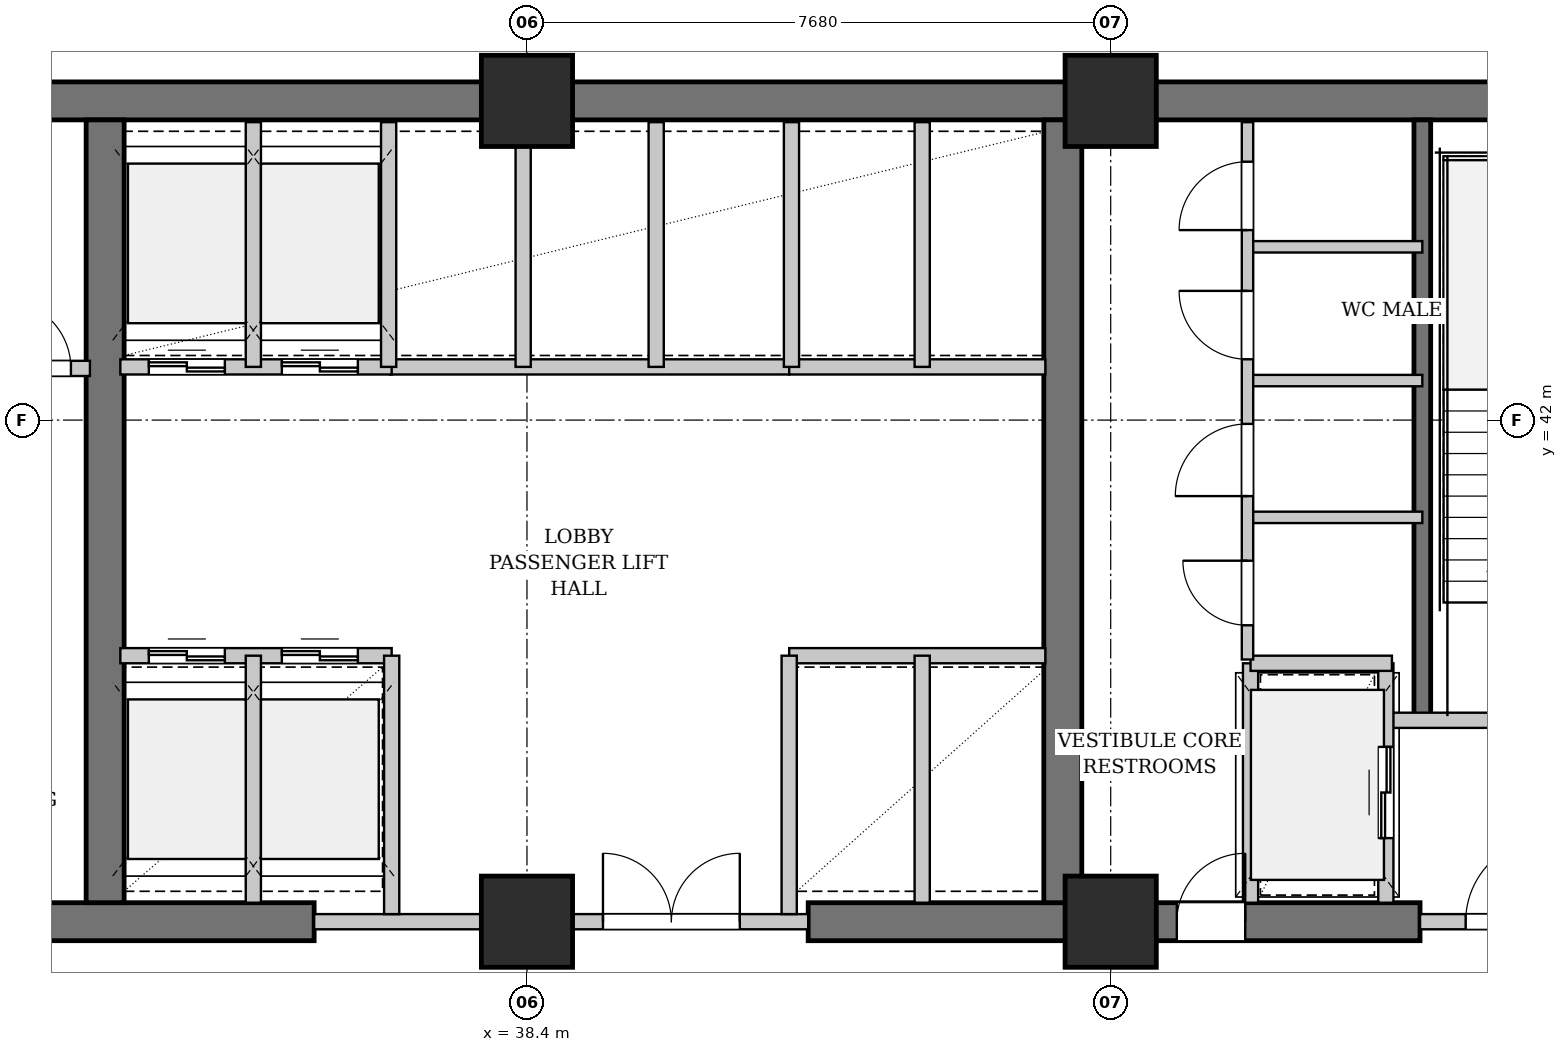
"""IFC4 building model, lengths in metres.
Left out: names, types, materials, properties, quantities, classifications, styles, units other than length and angle.
Written with IfcOpenShell. Run it as: python <this file> out.ifc"""

import sys

from ifc_helpers import new_model, si_unit, direction, frame, frame_2d, origin, origin_2d, place, context, subcontext, project, spatial, rectangle, extrude, element, fill, save


model = new_model("IFC4")
c1 = context("Model", 3, precision=1e-05, world=origin(), true_north=direction((0.0, 1.0)))
c2 = subcontext(c1, "Body", "Model", "MODEL_VIEW")
j1 = project(units=[si_unit("LENGTHUNIT", "METRE"), si_unit("PLANEANGLEUNIT", "RADIAN")], contexts=[c1])
p1 = place(None, origin())
s1 = spatial("IfcSite", under=j1, at=p1, CompositionType="ELEMENT")
p2 = place(p1, origin())
s2 = spatial("IfcBuilding", under=s1, at=p2, CompositionType="ELEMENT")
p3 = place(p2, frame((0.0, 0.0, 85.8)))
s3 = spatial("IfcBuildingStorey", under=s2, at=p3, CompositionType="ELEMENT", Elevation=85.8)
p4 = place(p3, frame((22.79, 46.2, 0.0), z_axis=(0.0, 0.0, 1.0), x_axis=(1.0, 0.0, 0.0)))
e1 = element("IfcWall", 1, at=p4, inside=s3, PredefinedType="SHEAR", context=c2, shape_type="SweptSolid", body=[
    extrude(rectangle(XDim=31.22, YDim=0.5, at=frame_2d((15.61, 0.0))), origin(), (0.0, 0.0, 1.0), 3.48),
])
p5 = place(p3, frame((30.72, 35.4, 0.0), z_axis=(0.0, 0.0, 1.0), x_axis=(1.0, 0.0, 0.0)))
e2 = element("IfcWall", 2, at=p5, inside=s3, PredefinedType="SHEAR", context=c2, shape_type="SweptSolid", body=[
    extrude(rectangle(XDim=4.88, YDim=0.5, at=frame_2d((2.44, 0.0))), origin(), (0.0, 0.0, 1.0), 3.48),
])
p6 = place(p3, frame((42.1, 35.4, 0.0), z_axis=(0.0, 0.0, 1.0), x_axis=(1.0, 0.0, 0.0)))
e3 = element("IfcWall", 3, at=p6, inside=s3, PredefinedType="SHEAR", context=c2, shape_type="SweptSolid", body=[
    extrude(rectangle(XDim=8.05, YDim=0.5, at=frame_2d((4.025, 0.0))), origin(), (0.0, 0.0, 1.0), 3.48),
])
p7 = place(p6, frame((4.85, 0.0, 0.0)))
e4 = element("IfcOpeningElement", 4, at=p7, cuts=e3, PredefinedType="OPENING", context=c2, shape_type="SweptSolid", body=[
    extrude(rectangle(XDim=0.9, YDim=2.15, at=frame_2d((0.45, 1.075))), frame((0.0, 0.26, 0.0), z_axis=(0.0, -1.0, 0.0), x_axis=(1.0, 0.0, 0.0)), (0.0, 0.0, 1.0), 0.52),
])
for number, where, z_axis, x_axis in (
    (5, (32.85, 35.65, 0.0), (0.0, 0.0, 1.0), (0.0, 1.0, 0.0)),
    (6, (45.45, 35.65, 0.0), (0.0, 0.0, 1.0), (0.0, 1.0, 0.0)),
):
    element("IfcWall", number, at=place(p3, frame(where, z_axis=z_axis, x_axis=x_axis)), inside=s3, PredefinedType="SHEAR", context=c2, shape_type="SweptSolid", body=[
        extrude(rectangle(XDim=10.3, YDim=0.5, at=frame_2d((5.15, 0.0))), origin(), (0.0, 0.0, 1.0), 3.48),
    ])
p8 = place(p3, frame((50.18, 38.05, 0.0), z_axis=(0.0, 0.0, 1.0), x_axis=(0.0, 1.0, 0.0)))
e7 = element("IfcWall", 7, at=p8, inside=s3, PredefinedType="SHEAR", context=c2, shape_type="SweptSolid", body=[
    extrude(rectangle(XDim=7.9, YDim=0.22, at=frame_2d((3.95, 0.0))), origin(), (0.0, 0.0, 1.0), 3.48),
])
for number, where, z_axis, x_axis in (
    (8, (38.4, 35.4, 0.0), (0.0, 0.0, 1.0), (1.0, 0.0, 0.0)),
    (9, (38.4, 46.2, 0.0), (0.0, 0.0, 1.0), (1.0, 0.0, 0.0)),
    (10, (46.08, 35.4, 0.0), (0.0, 0.0, 1.0), (1.0, 0.0, 0.0)),
    (11, (46.08, 46.2, 0.0), (0.0, 0.0, 1.0), (1.0, 0.0, 0.0)),
):
    element("IfcColumn", number, at=place(p3, frame(where, z_axis=z_axis, x_axis=x_axis)), inside=s3, PredefinedType="COLUMN", context=c2, shape_type="SweptSolid", body=[
        extrude(rectangle(XDim=1.2, YDim=1.2, at=origin_2d()), origin(), (0.0, 0.0, 1.0), 3.9),
    ])
p9 = place(p3, frame((27.32, 42.68, 0.0), z_axis=(0.0, 0.0, 1.0), x_axis=(1.0, 0.0, 0.0)))
e12 = element("IfcWall", 12, at=p9, inside=s3, PredefinedType="PARTITIONING", context=c2, shape_type="SweptSolid", body=[
    extrude(rectangle(XDim=5.33, YDim=0.2, at=frame_2d((2.665, 0.0))), origin(), (0.0, 0.0, 1.0), 3.48),
])
p10 = place(p9, frame((4.18, 0.0, 0.0)))
e13 = element("IfcOpeningElement", 13, at=p10, cuts=e12, PredefinedType="OPENING", context=c2, shape_type="SweptSolid", body=[
    extrude(rectangle(XDim=0.9, YDim=2.15, at=frame_2d((0.45, 1.075))), frame((0.0, 0.11, 0.0), z_axis=(0.0, -1.0, 0.0), x_axis=(1.0, 0.0, 0.0)), (0.0, 0.0, 1.0), 0.22),
])
p11 = place(p3, frame((35.6, 35.4, 0.0), z_axis=(0.0, 0.0, 1.0), x_axis=(1.0, 0.0, 0.0)))
e14 = element("IfcWall", 14, at=p11, inside=s3, PredefinedType="PARTITIONING", context=c2, shape_type="SweptSolid", body=[
    extrude(rectangle(XDim=6.5, YDim=0.2, at=frame_2d((3.25, 0.0))), origin(), (0.0, 0.0, 1.0), 2.275),
])
p12 = place(p11, frame((3.8, 0.0, 0.0)))
e15 = element("IfcOpeningElement", 15, at=p12, cuts=e14, PredefinedType="OPENING", context=c2, shape_type="SweptSolid", body=[
    extrude(rectangle(XDim=1.8, YDim=2.3, at=frame_2d((0.9, 1.15))), frame((0.0, 0.11, 0.0), z_axis=(0.0, -1.0, 0.0), x_axis=(1.0, 0.0, 0.0)), (0.0, 0.0, 1.0), 0.22),
])
p13 = place(p3, frame((36.6, 42.7, 0.0), z_axis=(0.0, 0.0, 1.0), x_axis=(1.0, 0.0, 0.0)))
e16 = element("IfcWall", 16, at=p13, inside=s3, PredefinedType="PARTITIONING", context=c2, shape_type="SweptSolid", body=[
    extrude(rectangle(XDim=5.25, YDim=0.2, at=frame_2d((2.625, 0.0))), origin(), (0.0, 0.0, 1.0), 3.48),
])
p14 = place(p3, frame((38.35, 42.7, 0.0), z_axis=(0.0, 0.0, 1.0), x_axis=(0.0, 1.0, 0.0)))
e17 = element("IfcWall", 17, at=p14, inside=s3, PredefinedType="PARTITIONING", context=c2, shape_type="SweptSolid", body=[
    extrude(rectangle(XDim=3.22, YDim=0.2, at=frame_2d((1.61, 0.0))), origin(), (0.0, 0.0, 1.0), 2.565),
])
p15 = place(p3, frame((40.1, 42.7, 0.0), z_axis=(0.0, 0.0, 1.0), x_axis=(0.0, 1.0, 0.0)))
e18 = element("IfcWall", 18, at=p15, inside=s3, PredefinedType="PARTITIONING", context=c2, shape_type="SweptSolid", body=[
    extrude(rectangle(XDim=3.22, YDim=0.2, at=frame_2d((1.61, 0.0))), origin(), (0.0, 0.0, 1.0), 3.48),
])
p16 = place(p3, frame((33.05, 38.9, 0.0), z_axis=(0.0, 0.0, 1.0), x_axis=(1.0, 0.0, 0.0)))
e19 = element("IfcWall", 19, at=p16, inside=s3, PredefinedType="PARTITIONING", context=c2, shape_type="SweptSolid", body=[
    extrude(rectangle(XDim=3.57, YDim=0.2, at=frame_2d((1.785, 0.0))), origin(), (0.0, 0.0, 1.0), 3.48),
])
p17 = place(p16, frame((0.375, 0.0, 0.0)))
e20 = element("IfcOpeningElement", 20, at=p17, cuts=e19, PredefinedType="OPENING", context=c2, shape_type="SweptSolid", body=[
    extrude(rectangle(XDim=1.0, YDim=2.2, at=frame_2d((0.5, 1.1))), frame((0.0, 0.11, 0.0), z_axis=(0.0, -1.0, 0.0), x_axis=(1.0, 0.0, 0.0)), (0.0, 0.0, 1.0), 0.22),
])
p18 = place(p16, frame((2.125, 0.0, 0.0)))
e21 = element("IfcOpeningElement", 21, at=p18, cuts=e19, PredefinedType="OPENING", context=c2, shape_type="SweptSolid", body=[
    extrude(rectangle(XDim=1.0, YDim=2.2, at=frame_2d((0.5, 1.1))), frame((0.0, 0.11, 0.0), z_axis=(0.0, -1.0, 0.0), x_axis=(1.0, 0.0, 0.0)), (0.0, 0.0, 1.0), 0.22),
])
p19 = place(p3, frame((33.05, 42.7, 0.0), z_axis=(0.0, 0.0, 1.0), x_axis=(1.0, 0.0, 0.0)))
e22 = element("IfcWall", 22, at=p19, inside=s3, PredefinedType="PARTITIONING", context=c2, shape_type="SweptSolid", body=[
    extrude(rectangle(XDim=3.57, YDim=0.2, at=frame_2d((1.785, 0.0))), origin(), (0.0, 0.0, 1.0), 3.48),
])
p20 = place(p19, frame((0.375, 0.0, 0.0)))
e23 = element("IfcOpeningElement", 23, at=p20, cuts=e22, PredefinedType="OPENING", context=c2, shape_type="SweptSolid", body=[
    extrude(rectangle(XDim=1.0, YDim=2.2, at=frame_2d((0.5, 1.1))), frame((0.0, 0.11, 0.0), z_axis=(0.0, -1.0, 0.0), x_axis=(1.0, 0.0, 0.0)), (0.0, 0.0, 1.0), 0.22),
])
p21 = place(p19, frame((2.125, 0.0, 0.0)))
e24 = element("IfcOpeningElement", 24, at=p21, cuts=e22, PredefinedType="OPENING", context=c2, shape_type="SweptSolid", body=[
    extrude(rectangle(XDim=1.0, YDim=2.2, at=frame_2d((0.5, 1.1))), frame((0.0, 0.11, 0.0), z_axis=(0.0, -1.0, 0.0), x_axis=(1.0, 0.0, 0.0)), (0.0, 0.0, 1.0), 0.22),
])
p22 = place(p3, frame((34.8, 35.65, 0.0), z_axis=(0.0, 0.0, 1.0), x_axis=(0.0, 1.0, 0.0)))
e25 = element("IfcWall", 25, at=p22, inside=s3, PredefinedType="PARTITIONING", context=c2, shape_type="SweptSolid", body=[
    extrude(rectangle(XDim=3.25, YDim=0.2, at=frame_2d((1.625, 0.0))), origin(), (0.0, 0.0, 1.0), 3.48),
])
p23 = place(p3, frame((34.8, 42.7, 0.0), z_axis=(0.0, 0.0, 1.0), x_axis=(0.0, 1.0, 0.0)))
e26 = element("IfcWall", 26, at=p23, inside=s3, PredefinedType="PARTITIONING", context=c2, shape_type="SweptSolid", body=[
    extrude(rectangle(XDim=3.22, YDim=0.2, at=frame_2d((1.61, 0.0))), origin(), (0.0, 0.0, 1.0), 3.48),
])
p24 = place(p3, frame((36.62, 35.5, 0.0), z_axis=(0.0, 0.0, 1.0), x_axis=(0.0, 1.0, 0.0)))
e27 = element("IfcWall", 27, at=p24, inside=s3, PredefinedType="PARTITIONING", context=c2, shape_type="SweptSolid", body=[
    extrude(rectangle(XDim=3.4, YDim=0.2, at=frame_2d((1.7, 0.0))), origin(), (0.0, 0.0, 1.0), 3.48),
])
p25 = place(p3, frame((36.58, 42.7, 0.0), z_axis=(0.0, 0.0, 1.0), x_axis=(0.0, 1.0, 0.0)))
e28 = element("IfcWall", 28, at=p25, inside=s3, PredefinedType="PARTITIONING", context=c2, shape_type="SweptSolid", body=[
    extrude(rectangle(XDim=3.22, YDim=0.2, at=frame_2d((1.61, 0.0))), origin(), (0.0, 0.0, 1.0), 3.48),
])
for number, where, z_axis, x_axis in (
    (29, (41.85, 38.9, 0.0), (0.0, 0.0, 1.0), (1.0, 0.0, 0.0)),
    (30, (41.85, 42.7, 0.0), (0.0, 0.0, 1.0), (1.0, 0.0, 0.0)),
):
    element("IfcWall", number, at=place(p3, frame(where, z_axis=z_axis, x_axis=x_axis)), inside=s3, PredefinedType="PARTITIONING", context=c2, shape_type="SweptSolid", body=[
        extrude(rectangle(XDim=3.37, YDim=0.2, at=frame_2d((1.685, 0.0))), origin(), (0.0, 0.0, 1.0), 3.48),
    ])
p26 = place(p3, frame((43.6, 35.65, 0.0), z_axis=(0.0, 0.0, 1.0), x_axis=(0.0, 1.0, 0.0)))
e31 = element("IfcWall", 31, at=p26, inside=s3, PredefinedType="PARTITIONING", context=c2, shape_type="SweptSolid", body=[
    extrude(rectangle(XDim=3.25, YDim=0.2, at=frame_2d((1.625, 0.0))), origin(), (0.0, 0.0, 1.0), 3.48),
])
p27 = place(p3, frame((43.6, 42.7, 0.0), z_axis=(0.0, 0.0, 1.0), x_axis=(0.0, 1.0, 0.0)))
e32 = element("IfcWall", 32, at=p27, inside=s3, PredefinedType="PARTITIONING", context=c2, shape_type="SweptSolid", body=[
    extrude(rectangle(XDim=3.22, YDim=0.2, at=frame_2d((1.61, 0.0))), origin(), (0.0, 0.0, 1.0), 3.48),
])
p28 = place(p3, frame((41.85, 35.5, 0.0), z_axis=(0.0, 0.0, 1.0), x_axis=(0.0, 1.0, 0.0)))
e33 = element("IfcWall", 33, at=p28, inside=s3, PredefinedType="PARTITIONING", context=c2, shape_type="SweptSolid", body=[
    extrude(rectangle(XDim=3.4, YDim=0.2, at=frame_2d((1.7, 0.0))), origin(), (0.0, 0.0, 1.0), 3.48),
])
p29 = place(p3, frame((41.88, 42.7, 0.0), z_axis=(0.0, 0.0, 1.0), x_axis=(0.0, 1.0, 0.0)))
e34 = element("IfcWall", 34, at=p29, inside=s3, PredefinedType="PARTITIONING", context=c2, shape_type="SweptSolid", body=[
    extrude(rectangle(XDim=3.22, YDim=0.2, at=frame_2d((1.61, 0.0))), origin(), (0.0, 0.0, 1.0), 3.48),
])
p30 = place(p3, frame((49.78, 38.05, 0.0), z_axis=(0.0, 0.0, 1.0), x_axis=(1.0, 0.0, 0.0)))
e35 = element("IfcWall", 35, at=p30, inside=s3, PredefinedType="PARTITIONING", context=c2, shape_type="SweptSolid", body=[
    extrude(rectangle(XDim=3.72, YDim=0.2, at=frame_2d((1.86, 0.0))), origin(), (0.0, 0.0, 1.0), 3.48),
])
p31 = place(p30, frame((1.436, 0.0, 0.0)))
e36 = element("IfcOpeningElement", 36, at=p31, cuts=e35, PredefinedType="OPENING", context=c2, shape_type="SweptSolid", body=[
    extrude(rectangle(XDim=1.1, YDim=2.15, at=frame_2d((0.55, 1.075))), frame((0.0, 0.11, 0.0), z_axis=(0.0, -1.0, 0.0), x_axis=(1.0, 0.0, 0.0)), (0.0, 0.0, 1.0), 0.22),
])
p32 = place(p3, frame((50.15, 35.4, 0.0), z_axis=(0.0, 0.0, 1.0), x_axis=(1.0, 0.0, 0.0)))
e37 = element("IfcWall", 37, at=p32, inside=s3, PredefinedType="PARTITIONING", context=c2, shape_type="SweptSolid", body=[
    extrude(rectangle(XDim=2.3, YDim=0.2, at=frame_2d((1.15, 0.0))), origin(), (0.0, 0.0, 1.0), 2.565),
])
p33 = place(p32, frame((0.6, 0.0, 0.0)))
e38 = element("IfcOpeningElement", 38, at=p33, cuts=e37, PredefinedType="OPENING", context=c2, shape_type="SweptSolid", body=[
    extrude(rectangle(XDim=1.1, YDim=2.15, at=frame_2d((0.55, 1.075))), frame((0.0, 0.11, 0.0), z_axis=(0.0, -1.0, 0.0), x_axis=(1.0, 0.0, 0.0)), (0.0, 0.0, 1.0), 0.22),
])
p34 = place(p3, frame((49.7, 35.65, 0.0), z_axis=(0.0, 0.0, 1.0), x_axis=(0.0, 1.0, 0.0)))
e39 = element("IfcWall", 39, at=p34, inside=s3, PredefinedType="PARTITIONING", context=c2, shape_type="SweptSolid", body=[
    extrude(rectangle(XDim=3.15, YDim=0.2, at=frame_2d((1.575, 0.0))), origin(), (0.0, 0.0, 1.0), 3.48),
])
p35 = place(p34, frame((0.85, 0.0, 0.0)))
e40 = element("IfcOpeningElement", 40, at=p35, cuts=e39, PredefinedType="OPENING", context=c2, shape_type="SweptSolid", body=[
    extrude(rectangle(XDim=1.2, YDim=2.2, at=frame_2d((0.6, 1.1))), frame((0.0, 0.11, 0.0), z_axis=(0.0, -1.0, 0.0), x_axis=(1.0, 0.0, 0.0)), (0.0, 0.0, 1.0), 0.22),
])
p36 = place(p3, frame((47.92, 35.65, 0.0), z_axis=(0.0, 0.0, 1.0), x_axis=(0.0, 1.0, 0.0)))
e41 = element("IfcWall", 41, at=p36, inside=s3, PredefinedType="PARTITIONING", context=c2, shape_type="SweptSolid", body=[
    extrude(rectangle(XDim=3.15, YDim=0.2, at=frame_2d((1.575, 0.0))), origin(), (0.0, 0.0, 1.0), 3.48),
])
p37 = place(p3, frame((47.92, 38.8, 0.0), z_axis=(0.0, 0.0, 1.0), x_axis=(1.0, 0.0, 0.0)))
e42 = element("IfcWall", 42, at=p37, inside=s3, PredefinedType="PARTITIONING", context=c2, shape_type="SweptSolid", body=[
    extrude(rectangle(XDim=1.86, YDim=0.2, at=frame_2d((0.93, 0.0))), origin(), (0.0, 0.0, 1.0), 3.48),
])
for number, where, z_axis, x_axis in (
    (43, (47.88, 40.72, 0.0), (0.0, 0.0, 1.0), (1.0, 0.0, 0.0)),
    (44, (47.88, 42.52, 0.0), (0.0, 0.0, 1.0), (1.0, 0.0, 0.0)),
    (45, (47.88, 44.28, 0.0), (0.0, 0.0, 1.0), (1.0, 0.0, 0.0)),
):
    element("IfcWall", number, at=place(p3, frame(where, z_axis=z_axis, x_axis=x_axis)), inside=s3, PredefinedType="PARTITIONING", context=c2, shape_type="SweptSolid", body=[
        extrude(rectangle(XDim=2.3, YDim=0.15, at=frame_2d((1.15, 0.0))), origin(), (0.0, 0.0, 1.0), 3.48),
    ])
p38 = place(p3, frame((47.88, 38.85, 0.0), z_axis=(0.0, 0.0, 1.0), x_axis=(0.0, 1.0, 0.0)))
e46 = element("IfcWall", 46, at=p38, inside=s3, PredefinedType="PARTITIONING", context=c2, shape_type="SweptSolid", body=[
    extrude(rectangle(XDim=7.07, YDim=0.15, at=frame_2d((3.535, 0.0))), origin(), (0.0, 0.0, 1.0), 3.48),
])
p39 = place(p38, frame((0.45, 0.0, 0.0)))
e47 = element("IfcOpeningElement", 47, at=p39, cuts=e46, PredefinedType="OPENING", context=c2, shape_type="SweptSolid", body=[
    extrude(rectangle(XDim=0.85, YDim=2.15, at=frame_2d((0.425, 1.075))), frame((0.0, 0.085, 0.0), z_axis=(0.0, -1.0, 0.0), x_axis=(1.0, 0.0, 0.0)), (0.0, 0.0, 1.0), 0.17),
])
p40 = place(p38, frame((2.15, 0.0, 0.0)))
e48 = element("IfcOpeningElement", 48, at=p40, cuts=e46, PredefinedType="OPENING", context=c2, shape_type="SweptSolid", body=[
    extrude(rectangle(XDim=0.95, YDim=2.15, at=frame_2d((0.475, 1.075))), frame((0.0, 0.085, 0.0), z_axis=(0.0, -1.0, 0.0), x_axis=(1.0, 0.0, 0.0)), (0.0, 0.0, 1.0), 0.17),
])
p41 = place(p38, frame((3.95, 0.0, 0.0)))
e49 = element("IfcOpeningElement", 49, at=p41, cuts=e46, PredefinedType="OPENING", context=c2, shape_type="SweptSolid", body=[
    extrude(rectangle(XDim=0.9, YDim=2.15, at=frame_2d((0.45, 1.075))), frame((0.0, 0.085, 0.0), z_axis=(0.0, -1.0, 0.0), x_axis=(1.0, 0.0, 0.0)), (0.0, 0.0, 1.0), 0.17),
])
p42 = place(p38, frame((5.65, 0.0, 0.0)))
e50 = element("IfcOpeningElement", 50, at=p42, cuts=e46, PredefinedType="OPENING", context=c2, shape_type="SweptSolid", body=[
    extrude(rectangle(XDim=0.9, YDim=2.15, at=frame_2d((0.45, 1.075))), frame((0.0, 0.085, 0.0), z_axis=(0.0, -1.0, 0.0), x_axis=(1.0, 0.0, 0.0)), (0.0, 0.0, 1.0), 0.17),
])
p43 = place(p10, origin())
e51 = element("IfcDoor", 51, at=p43, inside=s3, OperationType="SINGLE_SWING_LEFT", PredefinedType="DOOR", context=c2, shape_type="SweptSolid", body=[
    extrude(rectangle(XDim=0.9, YDim=2.15, at=frame_2d((0.45, 1.075))), frame((0.0, 0.025, 0.0), z_axis=(0.0, -1.0, 0.0), x_axis=(1.0, 0.0, 0.0)), (0.0, 0.0, 1.0), 0.05),
])
fill(e13, e51)
p44 = place(p12, origin())
e52 = element("IfcDoor", 52, at=p44, inside=s3, OperationType="DOUBLE_DOOR_SINGLE_SWING", PredefinedType="DOOR", context=c2, shape_type="SweptSolid", body=[
    extrude(rectangle(XDim=1.8, YDim=2.3, at=frame_2d((0.9, 1.15))), frame((0.0, 0.025, 0.0), z_axis=(0.0, -1.0, 0.0), x_axis=(1.0, 0.0, 0.0)), (0.0, 0.0, 1.0), 0.05),
])
fill(e15, e52)
p45 = place(p17, origin())
e53 = element("IfcDoor", 53, at=p45, inside=s3, OperationType="DOUBLE_DOOR_SLIDING", PredefinedType="DOOR", context=c2, shape_type="SweptSolid", body=[
    extrude(rectangle(XDim=1.0, YDim=2.2, at=frame_2d((0.5, 1.1))), frame((0.0, 0.025, 0.0), z_axis=(0.0, -1.0, 0.0), x_axis=(1.0, 0.0, 0.0)), (0.0, 0.0, 1.0), 0.05),
])
fill(e20, e53)
p46 = place(p18, origin())
e54 = element("IfcDoor", 54, at=p46, inside=s3, OperationType="DOUBLE_DOOR_SLIDING", PredefinedType="DOOR", context=c2, shape_type="SweptSolid", body=[
    extrude(rectangle(XDim=1.0, YDim=2.2, at=frame_2d((0.5, 1.1))), frame((0.0, 0.025, 0.0), z_axis=(0.0, -1.0, 0.0), x_axis=(1.0, 0.0, 0.0)), (0.0, 0.0, 1.0), 0.05),
])
fill(e21, e54)
p47 = place(p20, origin())
e55 = element("IfcDoor", 55, at=p47, inside=s3, OperationType="DOUBLE_DOOR_SLIDING", PredefinedType="DOOR", context=c2, shape_type="SweptSolid", body=[
    extrude(rectangle(XDim=1.0, YDim=2.2, at=frame_2d((0.5, 1.1))), frame((0.0, 0.025, 0.0), z_axis=(0.0, -1.0, 0.0), x_axis=(1.0, 0.0, 0.0)), (0.0, 0.0, 1.0), 0.05),
])
fill(e23, e55)
p48 = place(p21, origin())
e56 = element("IfcDoor", 56, at=p48, inside=s3, OperationType="DOUBLE_DOOR_SLIDING", PredefinedType="DOOR", context=c2, shape_type="SweptSolid", body=[
    extrude(rectangle(XDim=1.0, YDim=2.2, at=frame_2d((0.5, 1.1))), frame((0.0, 0.025, 0.0), z_axis=(0.0, -1.0, 0.0), x_axis=(1.0, 0.0, 0.0)), (0.0, 0.0, 1.0), 0.05),
])
fill(e24, e56)
p49 = place(p33, origin())
e57 = element("IfcDoor", 57, at=p49, inside=s3, OperationType="SINGLE_SWING_RIGHT", PredefinedType="DOOR", context=c2, shape_type="SweptSolid", body=[
    extrude(rectangle(XDim=1.1, YDim=2.15, at=frame_2d((0.55, 1.075))), frame((0.0, 0.025, 0.0), z_axis=(0.0, -1.0, 0.0), x_axis=(1.0, 0.0, 0.0)), (0.0, 0.0, 1.0), 0.05),
])
fill(e38, e57)
p50 = place(p35, origin())
e58 = element("IfcDoor", 58, at=p50, inside=s3, OperationType="DOUBLE_DOOR_SLIDING", PredefinedType="DOOR", context=c2, shape_type="SweptSolid", body=[
    extrude(rectangle(XDim=1.2, YDim=2.2, at=frame_2d((0.6, 1.1))), frame((0.0, 0.025, 0.0), z_axis=(0.0, -1.0, 0.0), x_axis=(1.0, 0.0, 0.0)), (0.0, 0.0, 1.0), 0.05),
])
fill(e40, e58)
p51 = place(p39, origin())
e59 = element("IfcDoor", 59, at=p51, inside=s3, OperationType="SINGLE_SWING_RIGHT", PredefinedType="DOOR", context=c2, shape_type="SweptSolid", body=[
    extrude(rectangle(XDim=0.85, YDim=2.15, at=frame_2d((0.425, 1.075))), frame((0.0, 0.025, 0.0), z_axis=(0.0, -1.0, 0.0), x_axis=(1.0, 0.0, 0.0)), (0.0, 0.0, 1.0), 0.05),
])
fill(e47, e59)
p52 = place(p40, origin())
e60 = element("IfcDoor", 60, at=p52, inside=s3, OperationType="SINGLE_SWING_LEFT", PredefinedType="DOOR", context=c2, shape_type="SweptSolid", body=[
    extrude(rectangle(XDim=0.95, YDim=2.15, at=frame_2d((0.475, 1.075))), frame((0.0, 0.025, 0.0), z_axis=(0.0, -1.0, 0.0), x_axis=(1.0, 0.0, 0.0)), (0.0, 0.0, 1.0), 0.05),
])
fill(e48, e60)
p53 = place(p41, origin())
e61 = element("IfcDoor", 61, at=p53, inside=s3, OperationType="SINGLE_SWING_RIGHT", PredefinedType="DOOR", context=c2, shape_type="SweptSolid", body=[
    extrude(rectangle(XDim=0.9, YDim=2.15, at=frame_2d((0.45, 1.075))), frame((0.0, 0.025, 0.0), z_axis=(0.0, -1.0, 0.0), x_axis=(1.0, 0.0, 0.0)), (0.0, 0.0, 1.0), 0.05),
])
fill(e49, e61)
p54 = place(p42, origin())
e62 = element("IfcDoor", 62, at=p54, inside=s3, OperationType="SINGLE_SWING_LEFT", PredefinedType="DOOR", context=c2, shape_type="SweptSolid", body=[
    extrude(rectangle(XDim=0.9, YDim=2.15, at=frame_2d((0.45, 1.075))), frame((0.0, 0.025, 0.0), z_axis=(0.0, -1.0, 0.0), x_axis=(1.0, 0.0, 0.0)), (0.0, 0.0, 1.0), 0.05),
])
fill(e50, e62)
p55 = place(p7, origin())
e63 = element("IfcDoor", 63, at=p55, inside=s3, OperationType="SINGLE_SWING_RIGHT", PredefinedType="DOOR", context=c2, shape_type="SweptSolid", body=[
    extrude(rectangle(XDim=0.9, YDim=2.15, at=frame_2d((0.45, 1.075))), frame((0.0, 0.025, 0.0), z_axis=(0.0, -1.0, 0.0), x_axis=(1.0, 0.0, 0.0)), (0.0, 0.0, 1.0), 0.05),
])
fill(e4, e63)
save(model, sys.argv[1])
